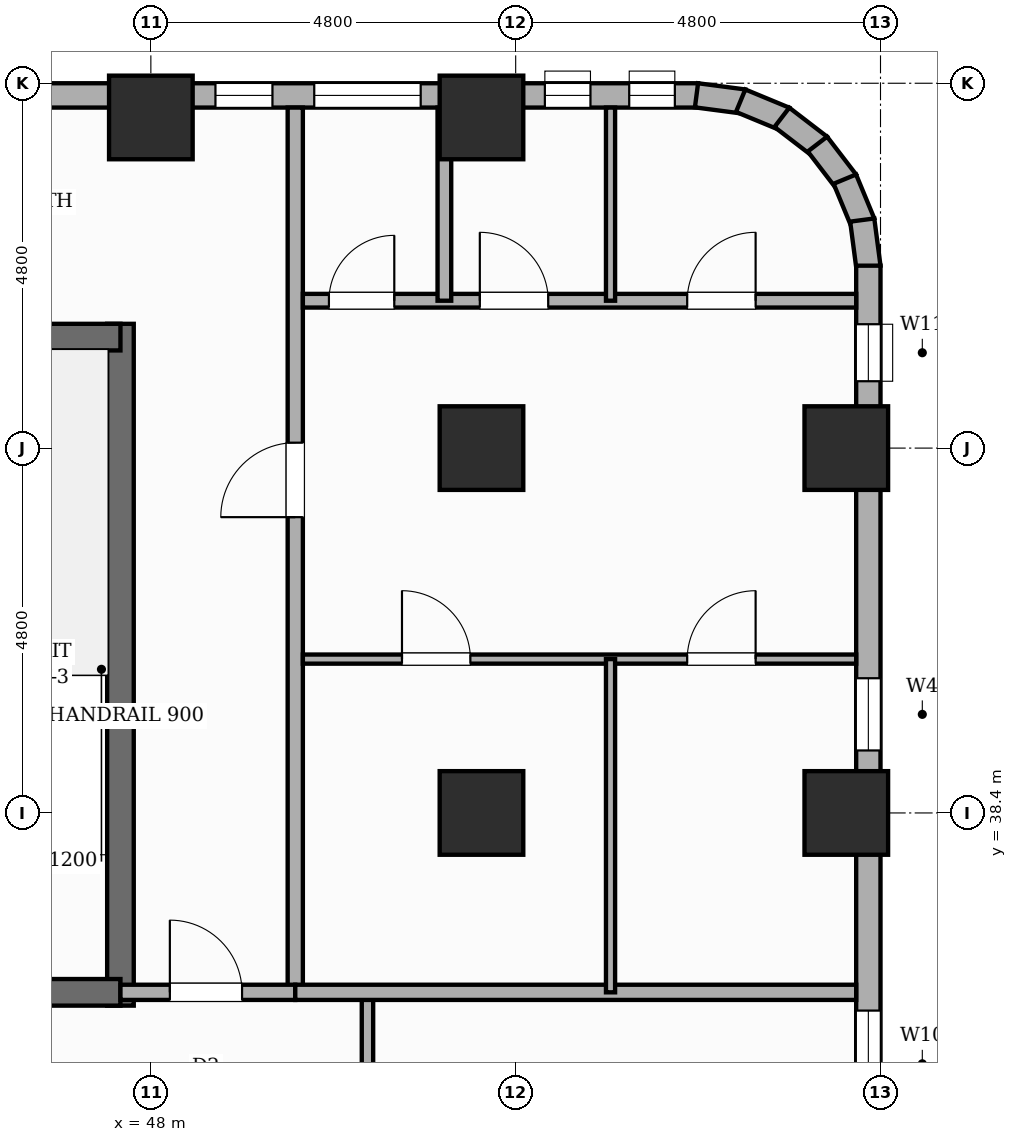
"""IFC4 building model, lengths in metres.
Left out: names, types, materials, properties, quantities, classifications, styles, units other than length and angle.
Written with IfcOpenShell. Run it as: python <this file> out.ifc"""

import sys

from ifc_helpers import new_model, si_unit, direction, frame, frame_2d, origin, origin_2d, place, context, subcontext, project, spatial, rectangle, extrude, element, fill, save


model = new_model("IFC4")
c1 = context("Model", 3, precision=1e-05, world=origin(), true_north=direction((0.0, 1.0)))
c2 = subcontext(c1, "Body", "Model", "MODEL_VIEW")
j1 = project(units=[si_unit("LENGTHUNIT", "METRE"), si_unit("PLANEANGLEUNIT", "RADIAN")], contexts=[c1])
p1 = place(None, origin())
s1 = spatial("IfcSite", under=j1, at=p1, CompositionType="ELEMENT")
p2 = place(p1, origin())
s2 = spatial("IfcBuilding", under=s1, at=p2, CompositionType="ELEMENT")
p3 = place(p2, frame((0.0, 0.0, 25.0)))
s3 = spatial("IfcBuildingStorey", under=s2, at=p3, CompositionType="ELEMENT", Elevation=25.0)
p4 = place(p3, frame((47.6, 35.865, 0.0), z_axis=(0.0, 0.0, 1.0), x_axis=(0.0, 1.0, 0.0)))
e1 = element("IfcWall", 1, at=p4, inside=s3, PredefinedType="SHEAR", context=c2, shape_type="SweptSolid", body=[
    extrude(rectangle(XDim=8.97, YDim=0.35, at=frame_2d((4.485, 0.0))), origin(), (0.0, 0.0, 1.0), 3.6),
])
for number, where, z_axis, x_axis in (
    (2, (44.02, 36.04, 0.0), (0.0, 0.0, 1.0), (1.0, 0.0, 0.0)),
    (3, (44.02, 44.66, 0.0), (0.0, 0.0, 1.0), (1.0, 0.0, 0.0)),
):
    element("IfcWall", number, at=place(p3, frame(where, z_axis=z_axis, x_axis=x_axis)), inside=s3, PredefinedType="SHEAR", context=c2, shape_type="SweptSolid", body=[
        extrude(rectangle(XDim=3.58, YDim=0.35, at=frame_2d((1.79, 0.0))), origin(), (0.0, 0.0, 1.0), 3.6),
    ])
for number, where, z_axis, x_axis in (
    (4, (48.0, 47.55, 0.0), (0.0, 0.0, 1.0), (1.0, 0.0, 0.0)),
    (5, (52.35, 38.4, 0.0), (0.0, 0.0, 1.0), (1.0, 0.0, 0.0)),
    (6, (52.35, 43.2, 0.0), (0.0, 0.0, 1.0), (1.0, 0.0, 0.0)),
    (7, (52.35, 47.55, 0.0), (0.0, 0.0, 1.0), (1.0, 0.0, 0.0)),
    (8, (57.15, 38.4, 0.0), (0.0, 0.0, 1.0), (1.0, 0.0, 0.0)),
    (9, (57.15, 43.2, 0.0), (0.0, 0.0, 1.0), (1.0, 0.0, 0.0)),
):
    element("IfcColumn", number, at=place(p3, frame(where, z_axis=z_axis, x_axis=x_axis)), inside=s3, PredefinedType="COLUMN", context=c2, shape_type="SweptSolid", body=[
        extrude(rectangle(XDim=1.1, YDim=1.1, at=origin_2d()), origin(), (0.0, 0.0, 1.0), 3.6),
    ])
p5 = place(p3, frame((7.2, 47.84, 0.0), z_axis=(0.0, 0.0, 1.0), x_axis=(1.0, 0.0, 0.0)))
e10 = element("IfcWall", 10, at=p5, inside=s3, PredefinedType="STANDARD", context=c2, shape_type="SweptSolid", body=[
    extrude(rectangle(XDim=48.0, YDim=0.32, at=frame_2d((24.0, 0.0))), origin(), (0.0, 0.0, 1.0), 2.53),
])
p6 = place(p5, frame((24.97, 0.0, 0.45)))
e11 = element("IfcOpeningElement", 11, at=p6, cuts=e10, PredefinedType="OPENING", context=c2, shape_type="SweptSolid", body=[
    extrude(rectangle(XDim=0.6, YDim=1.8, at=frame_2d((0.3, 0.9))), frame((0.0, 0.17, 0.0), z_axis=(0.0, -1.0, 0.0), x_axis=(1.0, 0.0, 0.0)), (0.0, 0.0, 1.0), 0.34),
])
p7 = place(p5, frame((32.435, 0.0, 0.65)))
e12 = element("IfcOpeningElement", 12, at=p7, cuts=e10, PredefinedType="OPENING", context=c2, shape_type="SweptSolid", body=[
    extrude(rectangle(XDim=1.4, YDim=1.1, at=frame_2d((0.7, 0.55))), frame((0.0, 0.17, 0.0), z_axis=(0.0, -1.0, 0.0), x_axis=(1.0, 0.0, 0.0)), (0.0, 0.0, 1.0), 0.34),
])
p8 = place(p5, frame((47.094, 0.0, 0.45)))
e13 = element("IfcOpeningElement", 13, at=p8, cuts=e10, PredefinedType="OPENING", context=c2, shape_type="SweptSolid", body=[
    extrude(rectangle(XDim=0.6, YDim=1.8, at=frame_2d((0.3, 0.9))), frame((0.0, 0.17, 0.0), z_axis=(0.0, -1.0, 0.0), x_axis=(1.0, 0.0, 0.0)), (0.0, 0.0, 1.0), 0.34),
])
p9 = place(p5, frame((18.74, 0.0, 0.45)))
e14 = element("IfcOpeningElement", 14, at=p9, cuts=e10, PredefinedType="OPENING", context=c2, shape_type="SweptSolid", body=[
    extrude(rectangle(XDim=0.95, YDim=1.8, at=frame_2d((0.475, 0.9))), frame((0.0, 0.17, 0.0), z_axis=(0.0, -1.0, 0.0), x_axis=(1.0, 0.0, 0.0)), (0.0, 0.0, 1.0), 0.34),
])
p10 = place(p5, frame((41.65, 0.0, 0.45)))
e15 = element("IfcOpeningElement", 15, at=p10, cuts=e10, PredefinedType="OPENING", context=c2, shape_type="SweptSolid", body=[
    extrude(rectangle(XDim=0.75, YDim=1.8, at=frame_2d((0.375, 0.9))), frame((0.0, 0.17, 0.0), z_axis=(0.0, -1.0, 0.0), x_axis=(1.0, 0.0, 0.0)), (0.0, 0.0, 1.0), 0.34),
])
p11 = place(p5, frame((37.736, 0.0, 0.65)))
e16 = element("IfcOpeningElement", 16, at=p11, cuts=e10, PredefinedType="OPENING", context=c2, shape_type="SweptSolid", body=[
    extrude(rectangle(XDim=1.4, YDim=1.1, at=frame_2d((0.7, 0.55))), frame((0.0, 0.17, 0.0), z_axis=(0.0, -1.0, 0.0), x_axis=(1.0, 0.0, 0.0)), (0.0, 0.0, 1.0), 0.34),
])
p12 = place(p5, frame((0.47, 0.0, 0.45)))
e17 = element("IfcOpeningElement", 17, at=p12, cuts=e10, PredefinedType="OPENING", context=c2, shape_type="SweptSolid", body=[
    extrude(rectangle(XDim=0.95, YDim=1.8, at=frame_2d((0.475, 0.9))), frame((0.0, 0.17, 0.0), z_axis=(0.0, -1.0, 0.0), x_axis=(1.0, 0.0, 0.0)), (0.0, 0.0, 1.0), 0.34),
])
p13 = place(p5, frame((10.215, 0.0, 0.45)))
e18 = element("IfcOpeningElement", 18, at=p13, cuts=e10, PredefinedType="OPENING", context=c2, shape_type="SweptSolid", body=[
    extrude(rectangle(XDim=0.95, YDim=1.8, at=frame_2d((0.475, 0.9))), frame((0.0, 0.17, 0.0), z_axis=(0.0, -1.0, 0.0), x_axis=(1.0, 0.0, 0.0)), (0.0, 0.0, 1.0), 0.34),
])
p14 = place(p5, frame((22.87, 0.0, 0.65)))
e19 = element("IfcOpeningElement", 19, at=p14, cuts=e10, PredefinedType="OPENING", context=c2, shape_type="SweptSolid", body=[
    extrude(rectangle(XDim=1.4, YDim=1.1, at=frame_2d((0.7, 0.55))), frame((0.0, 0.17, 0.0), z_axis=(0.0, -1.0, 0.0), x_axis=(1.0, 0.0, 0.0)), (0.0, 0.0, 1.0), 0.34),
])
p15 = place(p5, frame((28.03, 0.0, 0.65)))
e20 = element("IfcOpeningElement", 20, at=p15, cuts=e10, PredefinedType="OPENING", context=c2, shape_type="SweptSolid", body=[
    extrude(rectangle(XDim=1.4, YDim=1.1, at=frame_2d((0.7, 0.55))), frame((0.0, 0.17, 0.0), z_axis=(0.0, -1.0, 0.0), x_axis=(1.0, 0.0, 0.0)), (0.0, 0.0, 1.0), 0.34),
])
p16 = place(p5, frame((42.95, 0.0, 0.65)))
e21 = element("IfcOpeningElement", 21, at=p16, cuts=e10, PredefinedType="OPENING", context=c2, shape_type="SweptSolid", body=[
    extrude(rectangle(XDim=1.4, YDim=1.1, at=frame_2d((0.7, 0.55))), frame((0.0, 0.17, 0.0), z_axis=(0.0, -1.0, 0.0), x_axis=(1.0, 0.0, 0.0)), (0.0, 0.0, 1.0), 0.34),
])
p17 = place(p5, frame((45.984, 0.0, 0.45)))
e22 = element("IfcOpeningElement", 22, at=p17, cuts=e10, PredefinedType="OPENING", context=c2, shape_type="SweptSolid", body=[
    extrude(rectangle(XDim=0.6, YDim=1.8, at=frame_2d((0.3, 0.9))), frame((0.0, 0.17, 0.0), z_axis=(0.0, -1.0, 0.0), x_axis=(1.0, 0.0, 0.0)), (0.0, 0.0, 1.0), 0.34),
])
for number, where, z_axis, x_axis in (
    (23, (55.179, 47.841, 0.0), (0.0, 0.0, 1.0), (0.991, -0.131, 0.0)),
    (24, (55.76, 47.771, 0.0), (0.0, 0.0, 1.0), (0.924, -0.383, 0.0)),
):
    element("IfcWall", number, at=place(p3, frame(where, z_axis=z_axis, x_axis=x_axis)), inside=s3, PredefinedType="STANDARD", context=c2, shape_type="SweptSolid", body=[
        extrude(rectangle(XDim=0.626, YDim=0.32, at=frame_2d((0.313, 0.0))), origin(), (0.0, 0.0, 1.0), 3.35),
    ])
p18 = place(p3, frame((56.302, 47.552, 0.0), z_axis=(0.0, 0.0, 1.0), x_axis=(0.793549926411, -0.608505147302, 0.0)))
e25 = element("IfcWall", 25, at=p18, inside=s3, PredefinedType="STANDARD", context=c2, shape_type="SweptSolid", body=[
    extrude(rectangle(XDim=0.627, YDim=0.32, at=frame_2d((0.313, 0.0))), origin(), (0.0, 0.0, 1.0), 3.35),
])
for number, where, z_axis, x_axis in (
    (26, (56.77, 47.2, 0.0), (0.0, 0.0, 1.0), (0.609, -0.793, 0.0)),
    (27, (57.131, 46.739, 0.0), (0.0, 0.0, 1.0), (0.383, -0.924, 0.0)),
    (28, (57.36, 46.2, 0.0), (0.0, 0.0, 1.0), (0.131, -0.991, 0.0)),
):
    element("IfcWall", number, at=place(p3, frame(where, z_axis=z_axis, x_axis=x_axis)), inside=s3, PredefinedType="STANDARD", context=c2, shape_type="SweptSolid", body=[
        extrude(rectangle(XDim=0.626, YDim=0.32, at=frame_2d((0.313, 0.0))), origin(), (0.0, 0.0, 1.0), 3.35),
    ])
p19 = place(p3, frame((57.44, 45.6, 0.0), z_axis=(0.0, 0.0, 1.0), x_axis=(0.0, -1.0, 0.0)))
e29 = element("IfcWall", 29, at=p19, inside=s3, PredefinedType="STANDARD", context=c2, shape_type="SweptSolid", body=[
    extrude(rectangle(XDim=14.4, YDim=0.32, at=frame_2d((7.2, 0.0))), origin(), (0.0, 0.0, 1.0), 2.53),
])
p20 = place(p19, frame((5.428, 0.0, 0.45)))
e30 = element("IfcOpeningElement", 30, at=p20, cuts=e29, PredefinedType="OPENING", context=c2, shape_type="SweptSolid", body=[
    extrude(rectangle(XDim=0.95, YDim=1.8, at=frame_2d((0.475, 0.9))), frame((0.0, 0.17, 0.0), z_axis=(0.0, -1.0, 0.0), x_axis=(1.0, 0.0, 0.0)), (0.0, 0.0, 1.0), 0.34),
])
p21 = place(p19, frame((9.8, 0.0, 0.65)))
e31 = element("IfcOpeningElement", 31, at=p21, cuts=e29, PredefinedType="OPENING", context=c2, shape_type="SweptSolid", body=[
    extrude(rectangle(XDim=1.4, YDim=1.1, at=frame_2d((0.7, 0.55))), frame((0.0, 0.17, 0.0), z_axis=(0.0, -1.0, 0.0), x_axis=(1.0, 0.0, 0.0)), (0.0, 0.0, 1.0), 0.34),
])
p22 = place(p19, frame((0.771, 0.0, 0.45)))
e32 = element("IfcOpeningElement", 32, at=p22, cuts=e29, PredefinedType="OPENING", context=c2, shape_type="SweptSolid", body=[
    extrude(rectangle(XDim=0.75, YDim=1.8, at=frame_2d((0.375, 0.9))), frame((0.0, 0.17, 0.0), z_axis=(0.0, -1.0, 0.0), x_axis=(1.0, 0.0, 0.0)), (0.0, 0.0, 1.0), 0.34),
])
p23 = place(p3, frame((49.9, 36.04, 0.0), z_axis=(0.0, 0.0, 1.0), x_axis=(0.0, 1.0, 0.0)))
e33 = element("IfcWall", 33, at=p23, inside=s3, PredefinedType="PARTITIONING", context=c2, shape_type="SweptSolid", body=[
    extrude(rectangle(XDim=11.64, YDim=0.2, at=frame_2d((5.82, 0.0))), origin(), (0.0, 0.0, 1.0), 3.35),
])
p24 = place(p23, frame((6.251, 0.0, 0.0)))
e34 = element("IfcOpeningElement", 34, at=p24, cuts=e33, PredefinedType="OPENING", context=c2, shape_type="SweptSolid", body=[
    extrude(rectangle(XDim=0.98, YDim=2.18, at=frame_2d((0.49, 1.09))), frame((0.0, 0.11, 0.0), z_axis=(0.0, -1.0, 0.0), x_axis=(1.0, 0.0, 0.0)), (0.0, 0.0, 1.0), 0.22),
])
p25 = place(p3, frame((47.6, 36.04, 0.0), z_axis=(0.0, 0.0, 1.0), x_axis=(1.0, 0.0, 0.0)))
e35 = element("IfcWall", 35, at=p25, inside=s3, PredefinedType="PARTITIONING", context=c2, shape_type="SweptSolid", body=[
    extrude(rectangle(XDim=2.3, YDim=0.2, at=frame_2d((1.15, 0.0))), origin(), (0.0, 0.0, 1.0), 3.35),
])
p26 = place(p25, frame((0.65, 0.0, 0.0)))
e36 = element("IfcOpeningElement", 36, at=p26, cuts=e35, PredefinedType="OPENING", context=c2, shape_type="SweptSolid", body=[
    extrude(rectangle(XDim=0.95, YDim=2.15, at=frame_2d((0.475, 1.075))), frame((0.0, 0.11, 0.0), z_axis=(0.0, -1.0, 0.0), x_axis=(1.0, 0.0, 0.0)), (0.0, 0.0, 1.0), 0.22),
])
p27 = place(p3, frame((50.85, 29.12, 0.0), z_axis=(0.0, 0.0, 1.0), x_axis=(0.0, 1.0, 0.0)))
e37 = element("IfcWall", 37, at=p27, inside=s3, PredefinedType="PARTITIONING", context=c2, shape_type="SweptSolid", body=[
    extrude(rectangle(XDim=6.92, YDim=0.15, at=frame_2d((3.46, 0.0))), origin(), (0.0, 0.0, 1.0), 3.35),
])
p28 = place(p27, frame((2.24, 0.0, 0.0)))
e38 = element("IfcOpeningElement", 38, at=p28, cuts=e37, PredefinedType="OPENING", context=c2, shape_type="SweptSolid", body=[
    extrude(rectangle(XDim=0.9, YDim=2.15, at=frame_2d((0.45, 1.075))), frame((0.0, 0.085, 0.0), z_axis=(0.0, -1.0, 0.0), x_axis=(1.0, 0.0, 0.0)), (0.0, 0.0, 1.0), 0.17),
])
p29 = place(p3, frame((49.9, 36.04, 0.0), z_axis=(0.0, 0.0, 1.0), x_axis=(1.0, 0.0, 0.0)))
e39 = element("IfcWall", 39, at=p29, inside=s3, PredefinedType="SOLIDWALL", context=c2, shape_type="SweptSolid", body=[
    extrude(rectangle(XDim=7.38, YDim=0.2, at=frame_2d((3.69, 0.0))), origin(), (0.0, 0.0, 1.0), 3.35),
])
p30 = place(p3, frame((50.0, 45.139, 0.0), z_axis=(0.0, 0.0, 1.0), x_axis=(1.0, 0.0, 0.0)))
e40 = element("IfcWall", 40, at=p30, inside=s3, PredefinedType="PLUMBINGWALL", context=c2, shape_type="SweptSolid", body=[
    extrude(rectangle(XDim=7.28, YDim=0.18, at=frame_2d((3.64, 0.0))), origin(), (0.0, 0.0, 1.0), 3.35),
])
p31 = place(p30, frame((0.343, 0.0, 0.0)))
e41 = element("IfcOpeningElement", 41, at=p31, cuts=e40, PredefinedType="OPENING", context=c2, shape_type="SweptSolid", body=[
    extrude(rectangle(XDim=0.86, YDim=2.1, at=frame_2d((0.43, 1.05))), frame((0.0, 0.1, 0.0), z_axis=(0.0, -1.0, 0.0), x_axis=(1.0, 0.0, 0.0)), (0.0, 0.0, 1.0), 0.2),
])
p32 = place(p30, frame((2.328, 0.0, 0.0)))
e42 = element("IfcOpeningElement", 42, at=p32, cuts=e40, PredefinedType="OPENING", context=c2, shape_type="SweptSolid", body=[
    extrude(rectangle(XDim=0.9, YDim=2.15, at=frame_2d((0.45, 1.075))), frame((0.0, 0.1, 0.0), z_axis=(0.0, -1.0, 0.0), x_axis=(1.0, 0.0, 0.0)), (0.0, 0.0, 1.0), 0.2),
])
p33 = place(p30, frame((5.057, 0.0, 0.0)))
e43 = element("IfcOpeningElement", 43, at=p33, cuts=e40, PredefinedType="OPENING", context=c2, shape_type="SweptSolid", body=[
    extrude(rectangle(XDim=0.9, YDim=2.15, at=frame_2d((0.45, 1.075))), frame((0.0, 0.1, 0.0), z_axis=(0.0, -1.0, 0.0), x_axis=(1.0, 0.0, 0.0)), (0.0, 0.0, 1.0), 0.2),
])
p34 = place(p3, frame((50.0, 40.424, 0.0), z_axis=(0.0, 0.0, 1.0), x_axis=(1.0, 0.0, 0.0)))
e44 = element("IfcWall", 44, at=p34, inside=s3, PredefinedType="PARTITIONING", context=c2, shape_type="SweptSolid", body=[
    extrude(rectangle(XDim=7.28, YDim=0.12, at=frame_2d((3.64, 0.0))), origin(), (0.0, 0.0, 1.0), 3.35),
])
p35 = place(p34, frame((1.304, 0.0, 0.0)))
e45 = element("IfcOpeningElement", 45, at=p35, cuts=e44, PredefinedType="OPENING", context=c2, shape_type="SweptSolid", body=[
    extrude(rectangle(XDim=0.9, YDim=2.15, at=frame_2d((0.45, 1.075))), frame((0.0, 0.07, 0.0), z_axis=(0.0, -1.0, 0.0), x_axis=(1.0, 0.0, 0.0)), (0.0, 0.0, 1.0), 0.14),
])
p36 = place(p34, frame((5.057, 0.0, 0.0)))
e46 = element("IfcOpeningElement", 46, at=p36, cuts=e44, PredefinedType="OPENING", context=c2, shape_type="SweptSolid", body=[
    extrude(rectangle(XDim=0.9, YDim=2.15, at=frame_2d((0.45, 1.075))), frame((0.0, 0.07, 0.0), z_axis=(0.0, -1.0, 0.0), x_axis=(1.0, 0.0, 0.0)), (0.0, 0.0, 1.0), 0.14),
])
p37 = place(p3, frame((54.048, 36.04, 0.0), z_axis=(0.0, 0.0, 1.0), x_axis=(0.0, 1.0, 0.0)))
e47 = element("IfcWall", 47, at=p37, inside=s3, PredefinedType="PARTITIONING", context=c2, shape_type="SweptSolid", body=[
    extrude(rectangle(XDim=4.384, YDim=0.12, at=frame_2d((2.192, 0.0))), origin(), (0.0, 0.0, 1.0), 3.35),
])
p38 = place(p3, frame((51.862, 45.139, 0.0), z_axis=(0.0, 0.0, 1.0), x_axis=(0.0, 1.0, 0.0)))
e48 = element("IfcWall", 48, at=p38, inside=s3, PredefinedType="PLUMBINGWALL", context=c2, shape_type="SweptSolid", body=[
    extrude(rectangle(XDim=2.541, YDim=0.18, at=frame_2d((1.271, 0.0))), origin(), (0.0, 0.0, 1.0), 3.35),
])
p39 = place(p3, frame((54.048, 45.139, 0.0), z_axis=(0.0, 0.0, 1.0), x_axis=(0.0, 1.0, 0.0)))
e49 = element("IfcWall", 49, at=p39, inside=s3, PredefinedType="PARTITIONING", context=c2, shape_type="SweptSolid", body=[
    extrude(rectangle(XDim=2.541, YDim=0.12, at=frame_2d((1.271, 0.0))), origin(), (0.0, 0.0, 1.0), 3.35),
])
p40 = place(p8, origin())
e50 = element("IfcWindow", 50, at=p40, inside=s3, PartitioningType="SINGLE_PANEL", PredefinedType="WINDOW", context=c2, shape_type="SweptSolid", body=[
    extrude(rectangle(XDim=0.6, YDim=1.8, at=frame_2d((0.3, 0.9))), frame((0.0, 0.03, 0.0), z_axis=(0.0, -1.0, 0.0), x_axis=(1.0, 0.0, 0.0)), (0.0, 0.0, 1.0), 0.06),
])
fill(e13, e50)
p41 = place(p10, origin())
e51 = element("IfcWindow", 51, at=p41, inside=s3, PartitioningType="SINGLE_PANEL", PredefinedType="WINDOW", context=c2, shape_type="SweptSolid", body=[
    extrude(rectangle(XDim=0.75, YDim=1.8, at=frame_2d((0.375, 0.9))), frame((0.0, 0.03, 0.0), z_axis=(0.0, -1.0, 0.0), x_axis=(1.0, 0.0, 0.0)), (0.0, 0.0, 1.0), 0.06),
])
fill(e15, e51)
p42 = place(p16, origin())
e52 = element("IfcWindow", 52, at=p42, inside=s3, PartitioningType="SINGLE_PANEL", PredefinedType="WINDOW", context=c2, shape_type="SweptSolid", body=[
    extrude(rectangle(XDim=1.4, YDim=1.1, at=frame_2d((0.7, 0.55))), frame((0.0, 0.03, 0.0), z_axis=(0.0, -1.0, 0.0), x_axis=(1.0, 0.0, 0.0)), (0.0, 0.0, 1.0), 0.06),
])
fill(e21, e52)
p43 = place(p17, origin())
e53 = element("IfcWindow", 53, at=p43, inside=s3, PartitioningType="SINGLE_PANEL", PredefinedType="WINDOW", context=c2, shape_type="SweptSolid", body=[
    extrude(rectangle(XDim=0.6, YDim=1.8, at=frame_2d((0.3, 0.9))), frame((0.0, 0.03, 0.0), z_axis=(0.0, -1.0, 0.0), x_axis=(1.0, 0.0, 0.0)), (0.0, 0.0, 1.0), 0.06),
])
fill(e22, e53)
p44 = place(p20, origin())
e54 = element("IfcWindow", 54, at=p44, inside=s3, PartitioningType="SINGLE_PANEL", PredefinedType="WINDOW", context=c2, shape_type="SweptSolid", body=[
    extrude(rectangle(XDim=0.95, YDim=1.8, at=frame_2d((0.475, 0.9))), frame((0.0, 0.03, 0.0), z_axis=(0.0, -1.0, 0.0), x_axis=(1.0, 0.0, 0.0)), (0.0, 0.0, 1.0), 0.06),
])
fill(e30, e54)
p45 = place(p21, origin())
e55 = element("IfcWindow", 55, at=p45, inside=s3, PartitioningType="SINGLE_PANEL", PredefinedType="WINDOW", context=c2, shape_type="SweptSolid", body=[
    extrude(rectangle(XDim=1.4, YDim=1.1, at=frame_2d((0.7, 0.55))), frame((0.0, 0.03, 0.0), z_axis=(0.0, -1.0, 0.0), x_axis=(1.0, 0.0, 0.0)), (0.0, 0.0, 1.0), 0.06),
])
fill(e31, e55)
p46 = place(p22, origin())
e56 = element("IfcWindow", 56, at=p46, inside=s3, PartitioningType="SINGLE_PANEL", PredefinedType="WINDOW", context=c2, shape_type="SweptSolid", body=[
    extrude(rectangle(XDim=0.75, YDim=1.8, at=frame_2d((0.375, 0.9))), frame((0.0, 0.03, 0.0), z_axis=(0.0, -1.0, 0.0), x_axis=(1.0, 0.0, 0.0)), (0.0, 0.0, 1.0), 0.06),
])
fill(e32, e56)
p47 = place(p26, origin())
e57 = element("IfcDoor", 57, at=p47, inside=s3, OperationType="SINGLE_SWING_LEFT", PredefinedType="DOOR", context=c2, shape_type="SweptSolid", body=[
    extrude(rectangle(XDim=0.95, YDim=2.15, at=frame_2d((0.475, 1.075))), frame((0.0, 0.025, 0.0), z_axis=(0.0, -1.0, 0.0), x_axis=(1.0, 0.0, 0.0)), (0.0, 0.0, 1.0), 0.05),
])
fill(e36, e57)
p48 = place(p24, origin())
e58 = element("IfcDoor", 58, at=p48, inside=s3, OperationType="SINGLE_SWING_LEFT", PredefinedType="DOOR", context=c2, shape_type="SweptSolid", body=[
    extrude(rectangle(XDim=0.98, YDim=2.18, at=frame_2d((0.49, 1.09))), frame((0.0, 0.025, 0.0), z_axis=(0.0, -1.0, 0.0), x_axis=(1.0, 0.0, 0.0)), (0.0, 0.0, 1.0), 0.05),
])
fill(e34, e58)
p49 = place(p35, origin())
e59 = element("IfcDoor", 59, at=p49, inside=s3, OperationType="SINGLE_SWING_LEFT", PredefinedType="DOOR", context=c2, shape_type="SweptSolid", body=[
    extrude(rectangle(XDim=0.9, YDim=2.15, at=frame_2d((0.45, 1.075))), frame((0.0, 0.025, 0.0), z_axis=(0.0, -1.0, 0.0), x_axis=(1.0, 0.0, 0.0)), (0.0, 0.0, 1.0), 0.05),
])
fill(e45, e59)
p50 = place(p36, origin())
e60 = element("IfcDoor", 60, at=p50, inside=s3, OperationType="SINGLE_SWING_RIGHT", PredefinedType="DOOR", context=c2, shape_type="SweptSolid", body=[
    extrude(rectangle(XDim=0.9, YDim=2.15, at=frame_2d((0.45, 1.075))), frame((0.0, 0.025, 0.0), z_axis=(0.0, -1.0, 0.0), x_axis=(1.0, 0.0, 0.0)), (0.0, 0.0, 1.0), 0.05),
])
fill(e46, e60)
p51 = place(p31, origin())
e61 = element("IfcDoor", 61, at=p51, inside=s3, OperationType="SINGLE_SWING_RIGHT", PredefinedType="DOOR", context=c2, shape_type="SweptSolid", body=[
    extrude(rectangle(XDim=0.86, YDim=2.1, at=frame_2d((0.43, 1.05))), frame((0.0, 0.025, 0.0), z_axis=(0.0, -1.0, 0.0), x_axis=(1.0, 0.0, 0.0)), (0.0, 0.0, 1.0), 0.05),
])
fill(e41, e61)
p52 = place(p32, origin())
e62 = element("IfcDoor", 62, at=p52, inside=s3, OperationType="SINGLE_SWING_LEFT", PredefinedType="DOOR", context=c2, shape_type="SweptSolid", body=[
    extrude(rectangle(XDim=0.9, YDim=2.15, at=frame_2d((0.45, 1.075))), frame((0.0, 0.025, 0.0), z_axis=(0.0, -1.0, 0.0), x_axis=(1.0, 0.0, 0.0)), (0.0, 0.0, 1.0), 0.05),
])
fill(e42, e62)
p53 = place(p33, origin())
e63 = element("IfcDoor", 63, at=p53, inside=s3, OperationType="SINGLE_SWING_RIGHT", PredefinedType="DOOR", context=c2, shape_type="SweptSolid", body=[
    extrude(rectangle(XDim=0.9, YDim=2.15, at=frame_2d((0.45, 1.075))), frame((0.0, 0.025, 0.0), z_axis=(0.0, -1.0, 0.0), x_axis=(1.0, 0.0, 0.0)), (0.0, 0.0, 1.0), 0.05),
])
fill(e43, e63)
save(model, sys.argv[1])
